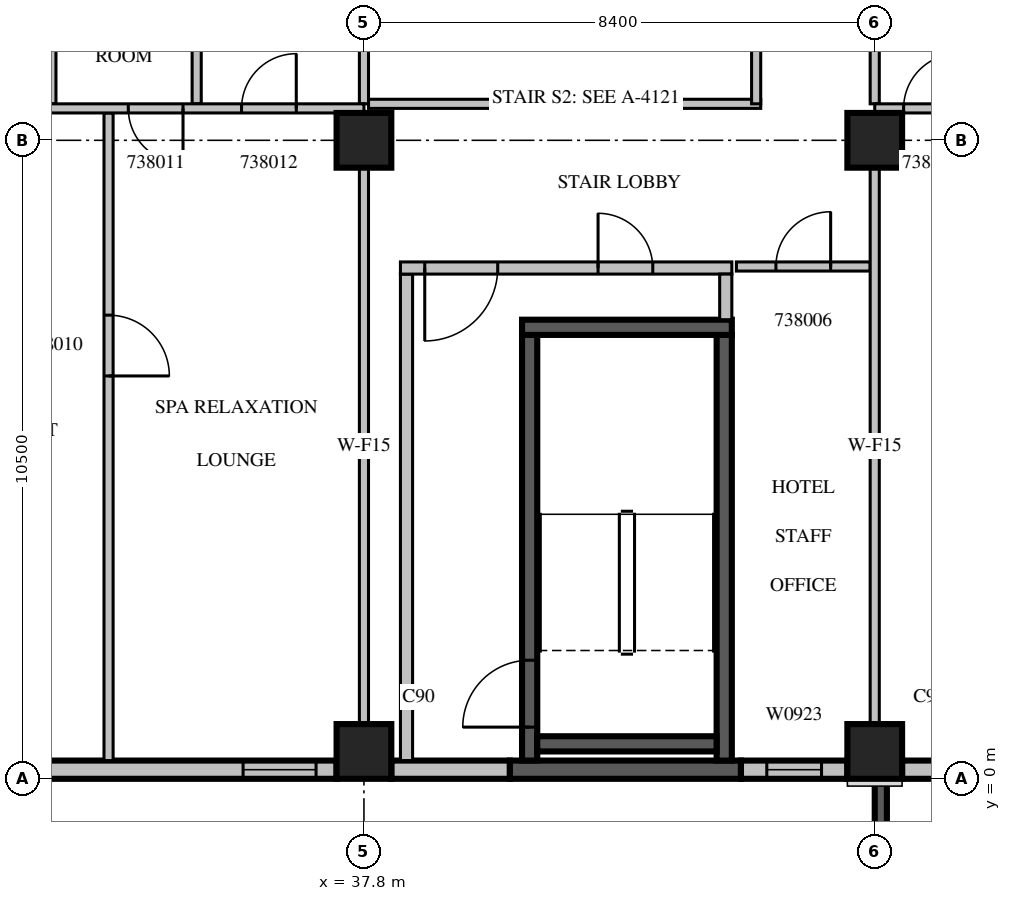
"""IFC4 building model, lengths in metres.
Left out: names, types, materials, properties, quantities, classifications, styles, units other than length and angle.
Written with IfcOpenShell. Run it as: python <this file> out.ifc"""

import sys

from ifc_helpers import new_model, si_unit, direction, frame, frame_2d, origin, origin_2d, place, context, subcontext, project, spatial, rectangle, extrude, source, transform, mapped, element, fill, save


model = new_model("IFC4")
c1 = context("Model", 3, precision=1e-05, world=origin(), true_north=direction((0.0, 1.0)))
c2 = subcontext(c1, "Body", "Model", "MODEL_VIEW")
j1 = project(units=[si_unit("LENGTHUNIT", "METRE"), si_unit("PLANEANGLEUNIT", "RADIAN")], contexts=[c1])
p1 = place(None, origin())
s1 = spatial("IfcSite", under=j1, at=p1, CompositionType="ELEMENT")
p2 = place(p1, origin())
s2 = spatial("IfcBuilding", under=s1, at=p2, CompositionType="ELEMENT")
p3 = place(p2, frame((0.0, 0.0, 177.8)))
s3 = spatial("IfcBuildingStorey", under=s2, at=p3, CompositionType="ELEMENT", Elevation=177.8)
m1 = source(origin(), c2, "Body", "SweptSolid", [
    extrude(rectangle(XDim=0.9, YDim=0.9, at=origin_2d()), origin(), (0.0, 0.0, 1.0), 3.8),
])
for number, where, z_axis, x_axis in (
    (1, (37.8, 0.45, 0.0), (0.0, 0.0, 1.0), (1.0, 0.0, 0.0)),
    (2, (46.2, 0.45, 0.0), (0.0, 0.0, 1.0), (1.0, 0.0, 0.0)),
    (3, (37.8, 10.5, 0.0), (0.0, 0.0, 1.0), (1.0, 0.0, 0.0)),
    (4, (46.2, 10.5, 0.0), (0.0, 0.0, 1.0), (1.0, 0.0, 0.0)),
):
    element("IfcColumn", number, at=place(p3, frame(where, z_axis=z_axis, x_axis=x_axis)), inside=s3, PredefinedType="COLUMN", context=c2, shape_type="MappedRepresentation", body=[
        mapped(m1, transform((0.0, 0.0, 0.0), scale=1.0)),
    ])
p4 = place(p3, frame((29.85, 0.15, 0.0), z_axis=(0.0, 0.0, 1.0), x_axis=(1.0, 0.0, 0.0)))
e5 = element("IfcWall", 5, at=p4, inside=s3, PredefinedType="STANDARD", context=c2, shape_type="SweptSolid", body=[
    extrude(rectangle(XDim=7.5, YDim=0.3, at=frame_2d((3.75, 0.0))), origin(), (0.0, 0.0, 1.0), 3.4),
])
p5 = place(p4, frame((0.438, 0.0, 0.6)))
e6 = element("IfcOpeningElement", 6, at=p5, cuts=e5, PredefinedType="OPENING", context=c2, shape_type="SweptSolid", body=[
    extrude(rectangle(XDim=1.2, YDim=2.3, at=frame_2d((0.6, 1.15))), frame((0.0, 0.16, 0.0), z_axis=(0.0, -1.0, 0.0), x_axis=(1.0, 0.0, 0.0)), (0.0, 0.0, 1.0), 0.32),
])
m2 = source(origin(), c2, "Body", "SweptSolid", [
    extrude(rectangle(XDim=1.2, YDim=2.3, at=frame_2d((0.6, 1.15))), frame((0.0, 0.16, 0.0), z_axis=(0.0, -1.0, 0.0), x_axis=(1.0, 0.0, 0.0)), (0.0, 0.0, 1.0), 0.32),
])
p6 = place(p4, frame((5.963, 0.0, 0.6)))
e7 = element("IfcOpeningElement", 7, at=p6, cuts=e5, PredefinedType="OPENING", context=c2, shape_type="MappedRepresentation", body=[
    mapped(m2, transform((0.0, 0.0, 0.0), scale=1.0)),
])
p7 = place(p3, frame((38.25, 0.15, 0.0), z_axis=(0.0, 0.0, 1.0), x_axis=(1.0, 0.0, 0.0)))
e8 = element("IfcWall", 8, at=p7, inside=s3, PredefinedType="STANDARD", context=c2, shape_type="SweptSolid", body=[
    extrude(rectangle(XDim=1.95, YDim=0.3, at=frame_2d((0.975, 0.0))), origin(), (0.0, 0.0, 1.0), 3.4),
])
p8 = place(p3, frame((40.2, 0.15, 0.0), z_axis=(0.0, 0.0, 1.0), x_axis=(1.0, 0.0, 0.0)))
e9 = element("IfcWall", 9, at=p8, inside=s3, PredefinedType="SOLIDWALL", context=c2, shape_type="SweptSolid", body=[
    extrude(rectangle(XDim=3.8, YDim=0.3, at=frame_2d((1.9, 0.0))), origin(), (0.0, 0.0, 1.0), 3.4),
])
p9 = place(p3, frame((44.0, 0.15, 0.0), z_axis=(0.0, 0.0, 1.0), x_axis=(1.0, 0.0, 0.0)))
e10 = element("IfcWall", 10, at=p9, inside=s3, PredefinedType="STANDARD", context=c2, shape_type="SweptSolid", body=[
    extrude(rectangle(XDim=1.75, YDim=0.3, at=frame_2d((0.875, 0.0))), origin(), (0.0, 0.0, 1.0), 3.4),
])
p10 = place(p9, frame((0.425, 0.0, 0.6)))
e11 = element("IfcOpeningElement", 11, at=p10, cuts=e10, PredefinedType="OPENING", context=c2, shape_type="SweptSolid", body=[
    extrude(rectangle(XDim=0.9, YDim=2.3, at=frame_2d((0.45, 1.15))), frame((0.0, 0.16, 0.0), z_axis=(0.0, -1.0, 0.0), x_axis=(1.0, 0.0, 0.0)), (0.0, 0.0, 1.0), 0.32),
])
p11 = place(p3, frame((46.65, 0.15, 0.0), z_axis=(0.0, 0.0, 1.0), x_axis=(1.0, 0.0, 0.0)))
e12 = element("IfcWall", 12, at=p11, inside=s3, PredefinedType="STANDARD", context=c2, shape_type="SweptSolid", body=[
    extrude(rectangle(XDim=4.98, YDim=0.3, at=frame_2d((2.49, 0.0))), origin(), (0.0, 0.0, 1.0), 3.4),
])
m3 = source(origin(), c2, "Body", "SweptSolid", [
    extrude(rectangle(XDim=1.0, YDim=2.1, at=frame_2d((0.5, 1.05))), frame((0.0, 0.16, 0.0), z_axis=(0.0, -1.0, 0.0), x_axis=(1.0, 0.0, 0.0)), (0.0, 0.0, 1.0), 0.32),
])
p12 = place(p11, frame((1.99, 0.0, 0.0)))
e13 = element("IfcOpeningElement", 13, at=p12, cuts=e12, PredefinedType="OPENING", context=c2, shape_type="MappedRepresentation", body=[
    mapped(m3, transform((0.0, 0.0, 0.0), scale=1.0)),
])
p13 = place(p3, frame((46.3, 0.0, 0.0), z_axis=(0.0, 0.0, 1.0), x_axis=(0.0, -1.0, 0.0)))
e14 = element("IfcWall", 14, at=p13, inside=s3, PredefinedType="SOLIDWALL", context=c2, shape_type="SweptSolid", body=[
    extrude(rectangle(XDim=3.9, YDim=0.2, at=frame_2d((1.95, 0.0))), origin(), (0.0, 0.0, 1.0), 3.39),
])
p14 = place(p13, frame((0.75, 0.0, 0.6)))
e15 = element("IfcOpeningElement", 15, at=p14, cuts=e14, PredefinedType="OPENING", context=c2, shape_type="SweptSolid", body=[
    extrude(rectangle(XDim=2.4, YDim=2.3, at=frame_2d((1.2, 1.15))), frame((0.0, 0.11, 0.0), z_axis=(0.0, -1.0, 0.0), x_axis=(1.0, 0.0, 0.0)), (0.0, 0.0, 1.0), 0.22),
])
p15 = place(p3, frame((40.525, 0.3, 0.0), z_axis=(0.0, 0.0, 1.0), x_axis=(0.0, 1.0, 0.0)))
e16 = element("IfcWall", 16, at=p15, inside=s3, PredefinedType="SOLIDWALL", context=c2, shape_type="SweptSolid", body=[
    extrude(rectangle(XDim=7.0, YDim=0.25, at=frame_2d((3.5, 0.0))), origin(), (0.0, 0.0, 1.0), 3.4),
])
m4 = source(origin(), c2, "Body", "SweptSolid", [
    extrude(rectangle(XDim=1.1, YDim=2.1, at=frame_2d((0.55, 1.05))), frame((0.0, 0.135, 0.0), z_axis=(0.0, -1.0, 0.0), x_axis=(1.0, 0.0, 0.0)), (0.0, 0.0, 1.0), 0.27),
])
p16 = place(p15, frame((0.55, 0.0, 0.0)))
e17 = element("IfcOpeningElement", 17, at=p16, cuts=e16, PredefinedType="OPENING", context=c2, shape_type="MappedRepresentation", body=[
    mapped(m4, transform((0.0, 0.0, 0.0), scale=1.0)),
])
m5 = source(origin(), c2, "Body", "SweptSolid", [
    extrude(rectangle(XDim=7.0, YDim=0.25, at=frame_2d((3.5, 0.0))), origin(), (0.0, 0.0, 1.0), 3.4),
])
p17 = place(p3, frame((43.725, 0.3, 0.0), z_axis=(0.0, 0.0, 1.0), x_axis=(0.0, 1.0, 0.0)))
e18 = element("IfcWall", 18, at=p17, inside=s3, PredefinedType="SOLIDWALL", context=c2, shape_type="MappedRepresentation", body=[
    mapped(m5, transform((0.0, 0.0, 0.0), scale=1.0)),
])
p18 = place(p3, frame((40.4, 7.425, 0.0), z_axis=(0.0, 0.0, 1.0), x_axis=(1.0, 0.0, 0.0)))
e19 = element("IfcWall", 19, at=p18, inside=s3, PredefinedType="SOLIDWALL", context=c2, shape_type="SweptSolid", body=[
    extrude(rectangle(XDim=3.45, YDim=0.25, at=frame_2d((1.725, 0.0))), origin(), (0.0, 0.0, 1.0), 3.4),
])
p19 = place(p3, frame((40.65, 0.575, 0.0), z_axis=(0.0, 0.0, 1.0), x_axis=(1.0, 0.0, 0.0)))
e20 = element("IfcWall", 20, at=p19, inside=s3, PredefinedType="SOLIDWALL", context=c2, shape_type="SweptSolid", body=[
    extrude(rectangle(XDim=2.95, YDim=0.25, at=frame_2d((1.475, 0.0))), origin(), (0.0, 0.0, 1.0), 3.4),
])
p20 = place(p3, frame((38.5, 0.3, 0.0), z_axis=(0.0, 0.0, 1.0), x_axis=(0.0, 1.0, 0.0)))
e21 = element("IfcWall", 21, at=p20, inside=s3, PredefinedType="PARTITIONING", context=c2, shape_type="SweptSolid", body=[
    extrude(rectangle(XDim=8.0, YDim=0.2, at=frame_2d((4.0, 0.0))), origin(), (0.0, 0.0, 1.0), 3.4),
])
p21 = place(p3, frame((38.4, 8.4, 0.0), z_axis=(0.0, 0.0, 1.0), x_axis=(1.0, 0.0, 0.0)))
e22 = element("IfcWall", 22, at=p21, inside=s3, PredefinedType="PARTITIONING", context=c2, shape_type="SweptSolid", body=[
    extrude(rectangle(XDim=5.45, YDim=0.2, at=frame_2d((2.725, 0.0))), origin(), (0.0, 0.0, 1.0), 3.4),
])
m6 = source(origin(), c2, "Body", "SweptSolid", [
    extrude(rectangle(XDim=1.2, YDim=2.1, at=frame_2d((0.6, 1.05))), frame((0.0, 0.11, 0.0), z_axis=(0.0, -1.0, 0.0), x_axis=(1.0, 0.0, 0.0)), (0.0, 0.0, 1.0), 0.22),
])
p22 = place(p21, frame((0.4, 0.0, 0.0)))
e23 = element("IfcOpeningElement", 23, at=p22, cuts=e22, PredefinedType="OPENING", context=c2, shape_type="MappedRepresentation", body=[
    mapped(m6, transform((0.0, 0.0, 0.0), scale=1.0)),
])
m7 = source(origin(), c2, "Body", "SweptSolid", [
    extrude(rectangle(XDim=0.9, YDim=2.1, at=frame_2d((0.45, 1.05))), frame((0.0, 0.11, 0.0), z_axis=(0.0, -1.0, 0.0), x_axis=(1.0, 0.0, 0.0)), (0.0, 0.0, 1.0), 0.22),
])
p23 = place(p21, frame((3.25, 0.0, 0.0)))
e24 = element("IfcOpeningElement", 24, at=p23, cuts=e22, PredefinedType="OPENING", context=c2, shape_type="MappedRepresentation", body=[
    mapped(m7, transform((0.0, 0.0, 0.0), scale=1.0)),
])
p24 = place(p3, frame((43.75, 7.55, 0.0), z_axis=(0.0, 0.0, 1.0), x_axis=(0.0, 1.0, 0.0)))
e25 = element("IfcWall", 25, at=p24, inside=s3, PredefinedType="PARTITIONING", context=c2, shape_type="SweptSolid", body=[
    extrude(rectangle(XDim=0.75, YDim=0.2, at=frame_2d((0.375, 0.0))), origin(), (0.0, 0.0, 1.0), 3.4),
])
p25 = place(p3, frame((37.875, 11.1, 0.0), z_axis=(0.0, 0.0, 1.0), x_axis=(1.0, 0.0, 0.0)))
e26 = element("IfcWall", 26, at=p25, inside=s3, PredefinedType="PARTITIONING", context=c2, shape_type="SweptSolid", body=[
    extrude(rectangle(XDim=6.45, YDim=0.15, at=frame_2d((3.225, 0.0))), origin(), (0.0, 0.0, 1.0), 3.4),
])
p26 = place(p3, frame((44.25, 11.1, 0.0), z_axis=(0.0, 0.0, 1.0), x_axis=(0.0, 1.0, 0.0)))
e27 = element("IfcWall", 27, at=p26, inside=s3, PredefinedType="PARTITIONING", context=c2, shape_type="SweptSolid", body=[
    extrude(rectangle(XDim=3.975, YDim=0.15, at=frame_2d((1.988, 0.0))), origin(), (0.0, 0.0, 1.0), 3.4),
])
p27 = place(p3, frame((46.125, 8.425, 0.0), z_axis=(0.0, 0.0, 1.0), x_axis=(-1.0, 0.0, 0.0)))
e28 = element("IfcWall", 28, at=p27, inside=s3, PredefinedType="PARTITIONING", context=c2, shape_type="SweptSolid", body=[
    extrude(rectangle(XDim=2.2, YDim=0.15, at=frame_2d((1.1, 0.0))), origin(), (0.0, 0.0, 1.0), 3.4),
])
m8 = source(origin(), c2, "Body", "SweptSolid", [
    extrude(rectangle(XDim=0.9, YDim=2.1, at=frame_2d((0.45, 1.05))), frame((0.0, 0.085, 0.0), z_axis=(0.0, -1.0, 0.0), x_axis=(1.0, 0.0, 0.0)), (0.0, 0.0, 1.0), 0.17),
])
p28 = place(p27, frame((0.65, 0.0, 0.0)))
e29 = element("IfcOpeningElement", 29, at=p28, cuts=e28, PredefinedType="OPENING", context=c2, shape_type="MappedRepresentation", body=[
    mapped(m8, transform((0.0, 0.0, 0.0), scale=1.0)),
])
p29 = place(p3, frame((33.6, 0.3, 0.0), z_axis=(0.0, 0.0, 1.0), x_axis=(0.0, 1.0, 0.0)))
e30 = element("IfcWall", 30, at=p29, inside=s3, PredefinedType="PARTITIONING", context=c2, shape_type="SweptSolid", body=[
    extrude(rectangle(XDim=10.65, YDim=0.15, at=frame_2d((5.325, 0.0))), origin(), (0.0, 0.0, 1.0), 3.4),
])
m9 = source(origin(), c2, "Body", "SweptSolid", [
    extrude(rectangle(XDim=1.0, YDim=2.1, at=frame_2d((0.5, 1.05))), frame((0.0, 0.085, 0.0), z_axis=(0.0, -1.0, 0.0), x_axis=(1.0, 0.0, 0.0)), (0.0, 0.0, 1.0), 0.17),
])
p30 = place(p29, frame((6.325, 0.0, 0.0)))
e31 = element("IfcOpeningElement", 31, at=p30, cuts=e30, PredefinedType="OPENING", context=c2, shape_type="MappedRepresentation", body=[
    mapped(m9, transform((0.0, 0.0, 0.0), scale=1.0)),
])
p31 = place(p3, frame((32.66, 11.1, 0.0), z_axis=(0.0, 0.0, 1.0), x_axis=(0.0, 1.0, 0.0)))
e32 = element("IfcWall", 32, at=p31, inside=s3, PredefinedType="PARTITIONING", context=c2, shape_type="SweptSolid", body=[
    extrude(rectangle(XDim=3.9, YDim=0.15, at=frame_2d((1.95, 0.0))), origin(), (0.0, 0.0, 1.0), 3.4),
])
m10 = source(origin(), c2, "Body", "SweptSolid", [
    extrude(rectangle(XDim=3.9, YDim=0.15, at=frame_2d((1.95, 0.0))), origin(), (0.0, 0.0, 1.0), 3.4),
])
p32 = place(p3, frame((35.049, 11.1, 0.0), z_axis=(0.0, 0.0, 1.0), x_axis=(0.0, 1.0, 0.0)))
e33 = element("IfcWall", 33, at=p32, inside=s3, PredefinedType="PARTITIONING", context=c2, shape_type="MappedRepresentation", body=[
    mapped(m10, transform((0.0, 0.0, 0.0), scale=1.0)),
])
p33 = place(p3, frame((37.8, 0.899, 0.0), z_axis=(0.0, 0.0, 1.0), x_axis=(0.0, 1.0, 0.0)))
e34 = element("IfcWall", 34, at=p33, inside=s3, PredefinedType="PARTITIONING", context=c2, shape_type="SweptSolid", body=[
    extrude(rectangle(XDim=9.152, YDim=0.15, at=frame_2d((4.576, 0.0))), origin(), (0.0, 0.0, 1.0), 3.4),
])
p34 = place(p3, frame((37.8, 11.1, 0.0), z_axis=(0.0, 0.0, 1.0), x_axis=(0.0, 1.0, 0.0)))
e35 = element("IfcWall", 35, at=p34, inside=s3, PredefinedType="PARTITIONING", context=c2, shape_type="MappedRepresentation", body=[
    mapped(m10, transform((0.0, 0.0, 0.0), scale=1.0)),
])
p35 = place(p3, frame((37.8, 11.025, 0.0), z_axis=(0.0, 0.0, 1.0), x_axis=(-1.0, 0.0, 0.0)))
e36 = element("IfcWall", 36, at=p35, inside=s3, PredefinedType="PARTITIONING", context=c2, shape_type="SweptSolid", body=[
    extrude(rectangle(XDim=8.4, YDim=0.15, at=frame_2d((4.2, 0.0))), origin(), (0.0, 0.0, 1.0), 3.4),
])
p36 = place(p35, frame((6.082, 0.0, 0.0)))
e37 = element("IfcOpeningElement", 37, at=p36, cuts=e36, PredefinedType="OPENING", context=c2, shape_type="MappedRepresentation", body=[
    mapped(m8, transform((0.0, 0.0, 0.0), scale=1.0)),
])
p37 = place(p35, frame((7.04, 0.0, 0.0)))
e38 = element("IfcOpeningElement", 38, at=p37, cuts=e36, PredefinedType="OPENING", context=c2, shape_type="MappedRepresentation", body=[
    mapped(m8, transform((0.0, 0.0, 0.0), scale=1.0)),
])
p38 = place(p35, frame((2.975, 0.0, 0.0)))
e39 = element("IfcOpeningElement", 39, at=p38, cuts=e36, PredefinedType="OPENING", context=c2, shape_type="MappedRepresentation", body=[
    mapped(m8, transform((0.0, 0.0, 0.0), scale=1.0)),
])
p39 = place(p35, frame((1.113, 0.0, 0.0)))
e40 = element("IfcOpeningElement", 40, at=p39, cuts=e36, PredefinedType="OPENING", context=c2, shape_type="MappedRepresentation", body=[
    mapped(m8, transform((0.0, 0.0, 0.0), scale=1.0)),
])
m11 = source(origin(), c2, "Body", "SweptSolid", [
    extrude(rectangle(XDim=9.152, YDim=0.15, at=frame_2d((4.576, 0.0))), origin(), (0.0, 0.0, 1.0), 3.4),
])
p40 = place(p3, frame((46.2, 0.899, 0.0), z_axis=(0.0, 0.0, 1.0), x_axis=(0.0, 1.0, 0.0)))
e41 = element("IfcWall", 41, at=p40, inside=s3, PredefinedType="PARTITIONING", context=c2, shape_type="MappedRepresentation", body=[
    mapped(m11, transform((0.0, 0.0, 0.0), scale=1.0)),
])
p41 = place(p3, frame((46.2, 11.1, 0.0), z_axis=(0.0, 0.0, 1.0), x_axis=(0.0, 1.0, 0.0)))
e42 = element("IfcWall", 42, at=p41, inside=s3, PredefinedType="PARTITIONING", context=c2, shape_type="MappedRepresentation", body=[
    mapped(m10, transform((0.0, 0.0, 0.0), scale=1.0)),
])
p42 = place(p3, frame((59.34, 11.025, 0.0), z_axis=(0.0, 0.0, 1.0), x_axis=(-1.0, 0.0, 0.0)))
e43 = element("IfcWall", 43, at=p42, inside=s3, PredefinedType="PARTITIONING", context=c2, shape_type="SweptSolid", body=[
    extrude(rectangle(XDim=13.14, YDim=0.15, at=frame_2d((6.57, 0.0))), origin(), (0.0, 0.0, 1.0), 3.4),
])
p43 = place(p42, frame((11.765, 0.0, 0.0)))
e44 = element("IfcOpeningElement", 44, at=p43, cuts=e43, PredefinedType="OPENING", context=c2, shape_type="MappedRepresentation", body=[
    mapped(m8, transform((0.0, 0.0, 0.0), scale=1.0)),
])
p44 = place(p42, frame((9.637, 0.0, 0.0)))
e45 = element("IfcOpeningElement", 45, at=p44, cuts=e43, PredefinedType="OPENING", context=c2, shape_type="MappedRepresentation", body=[
    mapped(m8, transform((0.0, 0.0, 0.0), scale=1.0)),
])
p45 = place(p42, frame((5.12, 0.0, 0.0)))
e46 = element("IfcOpeningElement", 46, at=p45, cuts=e43, PredefinedType="OPENING", context=c2, shape_type="MappedRepresentation", body=[
    mapped(m8, transform((0.0, 0.0, 0.0), scale=1.0)),
])
m12 = source(origin(), c2, "Body", "SweptSolid", [
    extrude(rectangle(XDim=1.2, YDim=2.3, at=frame_2d((0.6, 1.15))), frame((0.0, 0.03, 0.0), z_axis=(0.0, -1.0, 0.0), x_axis=(1.0, 0.0, 0.0)), (0.0, 0.0, 1.0), 0.06),
])
p46 = place(p6, origin())
e47 = element("IfcWindow", 47, at=p46, inside=s3, PartitioningType="SINGLE_PANEL", PredefinedType="WINDOW", context=c2, shape_type="MappedRepresentation", body=[
    mapped(m12, transform((0.0, 0.0, 0.0), scale=1.0)),
])
fill(e7, e47)
p47 = place(p10, origin())
e48 = element("IfcWindow", 48, at=p47, inside=s3, PartitioningType="SINGLE_PANEL", PredefinedType="WINDOW", context=c2, shape_type="SweptSolid", body=[
    extrude(rectangle(XDim=0.9, YDim=2.3, at=frame_2d((0.45, 1.15))), frame((0.0, 0.03, 0.0), z_axis=(0.0, -1.0, 0.0), x_axis=(1.0, 0.0, 0.0)), (0.0, 0.0, 1.0), 0.06),
])
fill(e11, e48)
m13 = source(origin(), c2, "Body", "SweptSolid", [
    extrude(rectangle(XDim=1.1, YDim=2.1, at=frame_2d((0.55, 1.05))), frame((0.0, 0.025, 0.0), z_axis=(0.0, -1.0, 0.0), x_axis=(1.0, 0.0, 0.0)), (0.0, 0.0, 1.0), 0.05),
])
p48 = place(p16, origin())
e49 = element("IfcDoor", 49, at=p48, inside=s3, OperationType="SINGLE_SWING_LEFT", PredefinedType="DOOR", context=c2, shape_type="MappedRepresentation", body=[
    mapped(m13, transform((0.0, 0.0, 0.0), scale=1.0)),
])
fill(e17, e49)
m14 = source(origin(), c2, "Body", "SweptSolid", [
    extrude(rectangle(XDim=1.2, YDim=2.1, at=frame_2d((0.6, 1.05))), frame((0.0, 0.025, 0.0), z_axis=(0.0, -1.0, 0.0), x_axis=(1.0, 0.0, 0.0)), (0.0, 0.0, 1.0), 0.05),
])
p49 = place(p22, origin())
e50 = element("IfcDoor", 50, at=p49, inside=s3, OperationType="SINGLE_SWING_RIGHT", PredefinedType="DOOR", context=c2, shape_type="MappedRepresentation", body=[
    mapped(m14, transform((0.0, 0.0, 0.0), scale=1.0)),
])
fill(e23, e50)
m15 = source(origin(), c2, "Body", "SweptSolid", [
    extrude(rectangle(XDim=0.9, YDim=2.1, at=frame_2d((0.45, 1.05))), frame((0.0, 0.025, 0.0), z_axis=(0.0, -1.0, 0.0), x_axis=(1.0, 0.0, 0.0)), (0.0, 0.0, 1.0), 0.05),
])
p50 = place(p23, origin())
e51 = element("IfcDoor", 51, at=p50, inside=s3, OperationType="SINGLE_SWING_LEFT", PredefinedType="DOOR", context=c2, shape_type="MappedRepresentation", body=[
    mapped(m15, transform((0.0, 0.0, 0.0), scale=1.0)),
])
fill(e24, e51)
p51 = place(p28, origin())
e52 = element("IfcDoor", 52, at=p51, inside=s3, OperationType="SINGLE_SWING_RIGHT", PredefinedType="DOOR", context=c2, shape_type="MappedRepresentation", body=[
    mapped(m15, transform((0.0, 0.0, 0.0), scale=1.0)),
])
fill(e29, e52)
m16 = source(origin(), c2, "Body", "SweptSolid", [
    extrude(rectangle(XDim=1.0, YDim=2.1, at=frame_2d((0.5, 1.05))), frame((0.0, 0.025, 0.0), z_axis=(0.0, -1.0, 0.0), x_axis=(1.0, 0.0, 0.0)), (0.0, 0.0, 1.0), 0.05),
])
p52 = place(p30, origin())
e53 = element("IfcDoor", 53, at=p52, inside=s3, OperationType="SINGLE_SWING_RIGHT", PredefinedType="DOOR", context=c2, shape_type="MappedRepresentation", body=[
    mapped(m16, transform((0.0, 0.0, 0.0), scale=1.0)),
])
fill(e31, e53)
p53 = place(p38, origin())
e54 = element("IfcDoor", 54, at=p53, inside=s3, OperationType="SINGLE_SWING_LEFT", PredefinedType="DOOR", context=c2, shape_type="MappedRepresentation", body=[
    mapped(m15, transform((0.0, 0.0, 0.0), scale=1.0)),
])
fill(e39, e54)
p54 = place(p39, origin())
e55 = element("IfcDoor", 55, at=p54, inside=s3, OperationType="SINGLE_SWING_RIGHT", PredefinedType="DOOR", context=c2, shape_type="MappedRepresentation", body=[
    mapped(m15, transform((0.0, 0.0, 0.0), scale=1.0)),
])
fill(e40, e55)
p55 = place(p43, origin())
e56 = element("IfcDoor", 56, at=p55, inside=s3, OperationType="SINGLE_SWING_RIGHT", PredefinedType="DOOR", context=c2, shape_type="MappedRepresentation", body=[
    mapped(m15, transform((0.0, 0.0, 0.0), scale=1.0)),
])
fill(e44, e56)
save(model, sys.argv[1])
